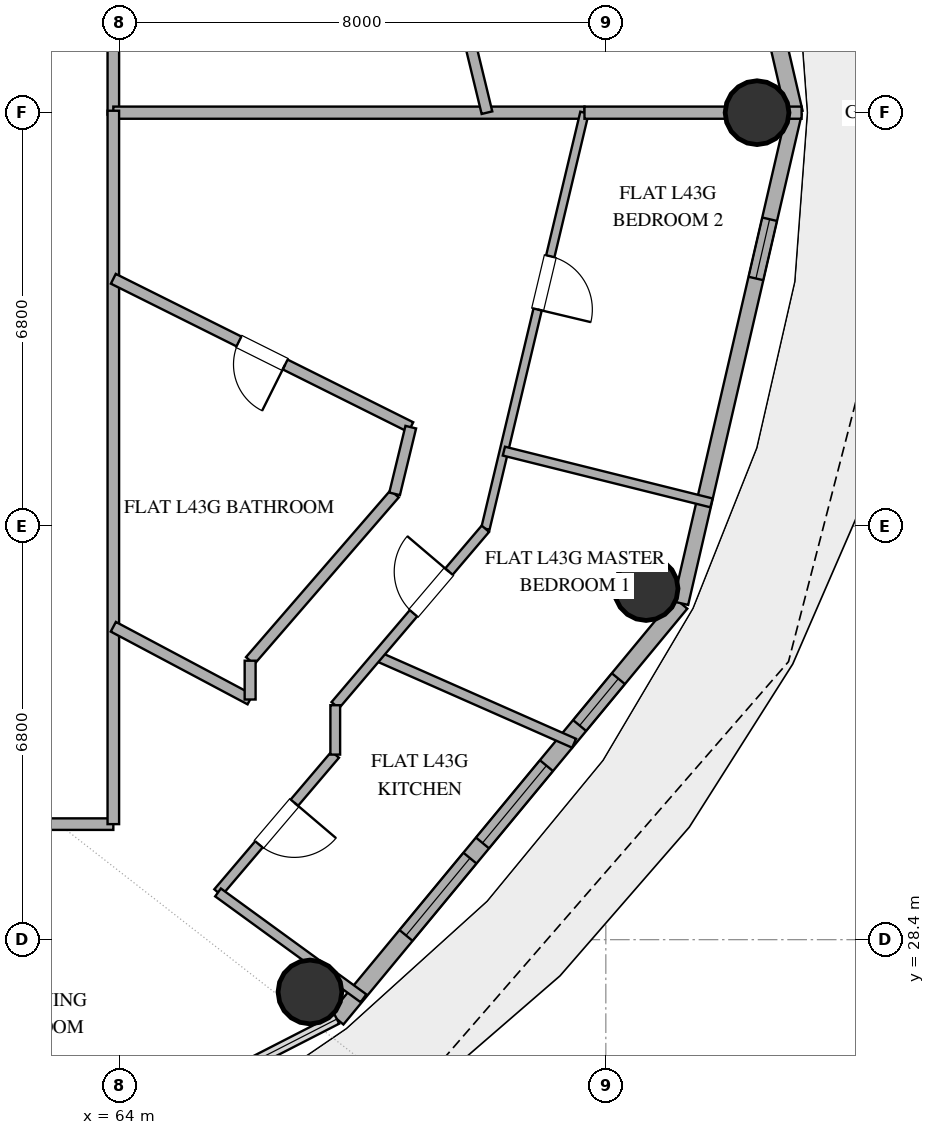
"""IFC4 building model, lengths in metres.
Left out: names, types, materials, properties, quantities, classifications, styles, units other than length and angle.
Written with IfcOpenShell. Run it as: python <this file> out.ifc"""

import sys

from ifc_helpers import new_model, si_unit, direction, frame, frame_2d, origin, origin_2d, place, context, subcontext, project, spatial, rectangle, hollow_circle, extrude, element, fill, save


model = new_model("IFC4")
c1 = context("Model", 3, precision=1e-05, world=origin(), true_north=direction((0.0, 1.0)))
c2 = subcontext(c1, "Body", "Model", "MODEL_VIEW")
j1 = project(units=[si_unit("LENGTHUNIT", "METRE"), si_unit("PLANEANGLEUNIT", "RADIAN")], contexts=[c1])
p1 = place(None, origin())
s1 = spatial("IfcSite", under=j1, at=p1, CompositionType="ELEMENT")
p2 = place(p1, origin())
s2 = spatial("IfcBuilding", under=s1, at=p2, CompositionType="ELEMENT")
p3 = place(p2, frame((0.0, 0.0, 172.2)))
s3 = spatial("IfcBuildingStorey", under=s2, at=p3, CompositionType="ELEMENT", Elevation=172.2)
for number, where, z_axis, x_axis in (
    (1, (74.487, 42.0, 0.0), (0.0, 0.0, 1.0), (1.0, 0.0, 0.0)),
    (2, (67.134, 27.54, 0.0), (0.0, 0.0, 1.0), (1.0, 0.0, 0.0)),
    (3, (72.662, 34.174, 0.0), (0.0, 0.0, 1.0), (1.0, 0.0, 0.0)),
):
    element("IfcColumn", number, at=place(p3, frame(where, z_axis=z_axis, x_axis=x_axis)), inside=s3, PredefinedType="COLUMN", context=c2, shape_type="SweptSolid", body=[
        extrude(hollow_circle(Radius=0.525, WallThickness=0.028, at=origin_2d()), origin(), (0.0, 0.0, 1.0), 3.38),
    ])
p4 = place(p3, frame((75.099, 42.0, 0.0), z_axis=(0.0, 0.0, 1.0), x_axis=(-0.225473184558, 0.974249374157, 0.0)))
e4 = element("IfcWall", 4, at=p4, inside=s3, PredefinedType="SOLIDWALL", context=c2, shape_type="SweptSolid", body=[
    extrude(rectangle(XDim=8.28, YDim=0.28, at=frame_2d((4.14, 0.0))), origin(), (0.0, 0.0, 1.0), 3.38),
])
p5 = place(p4, frame((5.694, 0.0, 0.0)))
e5 = element("IfcOpeningElement", 5, at=p5, cuts=e4, PredefinedType="OPENING", context=c2, shape_type="SweptSolid", body=[
    extrude(rectangle(XDim=1.05, YDim=2.2, at=frame_2d((0.525, 1.1))), frame((0.0, 0.15, 0.0), z_axis=(0.0, -1.0, 0.0), x_axis=(1.0, 0.0, 0.0)), (0.0, 0.0, 1.0), 0.3),
])
p6 = place(p3, frame((67.576, 27.094, 0.0), z_axis=(0.0, 0.0, 1.0), x_axis=(0.637333477683, 0.770588111915, 0.0)))
e6 = element("IfcWall", 6, at=p6, inside=s3, PredefinedType="SOLIDWALL", context=c2, shape_type="SweptSolid", body=[
    extrude(rectangle(XDim=8.875, YDim=0.28, at=frame_2d((4.438, 0.0))), origin(), (0.0, 0.0, 1.0), 3.38),
])
p7 = place(p6, frame((1.785, 0.0, 0.85)))
e7 = element("IfcOpeningElement", 7, at=p7, cuts=e6, PredefinedType="OPENING", context=c2, shape_type="SweptSolid", body=[
    extrude(rectangle(XDim=1.65, YDim=2.0, at=frame_2d((0.825, 1.0))), frame((0.0, 0.15, 0.0), z_axis=(0.0, -1.0, 0.0), x_axis=(1.0, 0.0, 0.0)), (0.0, 0.0, 1.0), 0.3),
])
p8 = place(p6, frame((3.759, 0.0, 0.85)))
e8 = element("IfcOpeningElement", 8, at=p8, cuts=e6, PredefinedType="OPENING", context=c2, shape_type="SweptSolid", body=[
    extrude(rectangle(XDim=1.65, YDim=2.0, at=frame_2d((0.825, 1.0))), frame((0.0, 0.15, 0.0), z_axis=(0.0, -1.0, 0.0), x_axis=(1.0, 0.0, 0.0)), (0.0, 0.0, 1.0), 0.3),
])
p9 = place(p6, frame((6.265, 0.0, 0.85)))
e9 = element("IfcOpeningElement", 9, at=p9, cuts=e6, PredefinedType="OPENING", context=c2, shape_type="SweptSolid", body=[
    extrude(rectangle(XDim=1.0, YDim=1.8, at=frame_2d((0.5, 0.9))), frame((0.0, 0.15, 0.0), z_axis=(0.0, -1.0, 0.0), x_axis=(1.0, 0.0, 0.0)), (0.0, 0.0, 1.0), 0.3),
])
p10 = place(p3, frame((73.232, 33.933, 0.0), z_axis=(0.0, 0.0, 1.0), x_axis=(0.225473184558, 0.974249374157, 0.0)))
e10 = element("IfcWall", 10, at=p10, inside=s3, PredefinedType="SOLIDWALL", context=c2, shape_type="SweptSolid", body=[
    extrude(rectangle(XDim=8.28, YDim=0.25, at=frame_2d((4.14, 0.0))), origin(), (0.0, 0.0, 1.0), 3.38),
])
p11 = place(p10, frame((5.481, 0.0, 1.42)))
e11 = element("IfcOpeningElement", 11, at=p11, cuts=e10, PredefinedType="OPENING", context=c2, shape_type="SweptSolid", body=[
    extrude(rectangle(XDim=1.0, YDim=1.05, at=frame_2d((0.5, 0.525))), frame((0.0, 0.135, 0.0), z_axis=(0.0, -1.0, 0.0), x_axis=(1.0, 0.0, 0.0)), (0.0, 0.0, 1.0), 0.27),
])
p12 = place(p3, frame((44.873, 30.3, 0.0), z_axis=(0.0, 0.0, 1.0), x_axis=(1.0, 0.0, 0.0)))
e12 = element("IfcWall", 12, at=p12, inside=s3, PredefinedType="PARTITIONING", context=c2, shape_type="SweptSolid", body=[
    extrude(rectangle(XDim=19.027, YDim=0.19, at=frame_2d((9.514, 0.0))), origin(), (0.0, 0.0, 1.0), 2.74),
])
p13 = place(p12, frame((5.01, 0.0, 0.0)))
e13 = element("IfcOpeningElement", 13, at=p13, cuts=e12, PredefinedType="OPENING", context=c2, shape_type="SweptSolid", body=[
    extrude(rectangle(XDim=1.0, YDim=2.2, at=frame_2d((0.5, 1.1))), frame((0.0, 0.105, 0.0), z_axis=(0.0, -1.0, 0.0), x_axis=(1.0, 0.0, 0.0)), (0.0, 0.0, 1.0), 0.21),
])
p14 = place(p12, frame((14.504, 0.0, 0.0)))
e14 = element("IfcOpeningElement", 14, at=p14, cuts=e12, PredefinedType="OPENING", context=c2, shape_type="SweptSolid", body=[
    extrude(rectangle(XDim=1.0, YDim=2.2, at=frame_2d((0.5, 1.1))), frame((0.0, 0.105, 0.0), z_axis=(0.0, -1.0, 0.0), x_axis=(1.0, 0.0, 0.0)), (0.0, 0.0, 1.0), 0.21),
])
p15 = place(p3, frame((63.9, 53.7, 0.0), z_axis=(0.0, 0.0, 1.0), x_axis=(0.0, -1.0, 0.0)))
e15 = element("IfcWall", 15, at=p15, inside=s3, PredefinedType="PARTITIONING", context=c2, shape_type="SweptSolid", body=[
    extrude(rectangle(XDim=11.732, YDim=0.19, at=frame_2d((5.866, 0.0))), origin(), (0.0, 0.0, 1.0), 2.74),
])
p16 = place(p15, frame((4.281, 0.0, 0.0)))
e16 = element("IfcOpeningElement", 16, at=p16, cuts=e15, PredefinedType="OPENING", context=c2, shape_type="SweptSolid", body=[
    extrude(rectangle(XDim=1.0, YDim=2.2, at=frame_2d((0.5, 1.1))), frame((0.0, 0.105, 0.0), z_axis=(0.0, -1.0, 0.0), x_axis=(1.0, 0.0, 0.0)), (0.0, 0.0, 1.0), 0.21),
])
p17 = place(p3, frame((63.9, 42.0, 0.0), z_axis=(0.0, 0.0, 1.0), x_axis=(1.0, 0.0, 0.0)))
e17 = element("IfcWall", 17, at=p17, inside=s3, PredefinedType="PARTITIONING", context=c2, shape_type="SweptSolid", body=[
    extrude(rectangle(XDim=7.749, YDim=0.2, at=frame_2d((3.875, 0.0))), origin(), (0.0, 0.0, 1.0), 2.74),
])
p18 = place(p3, frame((63.9, 42.032, 0.0), z_axis=(0.0, 0.0, 1.0), x_axis=(0.0, -1.0, 0.0)))
e18 = element("IfcWall", 18, at=p18, inside=s3, PredefinedType="PARTITIONING", context=c2, shape_type="SweptSolid", body=[
    extrude(rectangle(XDim=11.732, YDim=0.19, at=frame_2d((5.866, 0.0))), origin(), (0.0, 0.0, 1.0), 2.74),
])
p19 = place(p3, frame((71.649, 42.0, 0.0), z_axis=(0.0, 0.0, 1.0), x_axis=(-0.231658068135, -0.972797275627, 0.0)))
e19 = element("IfcWall", 19, at=p19, inside=s3, PredefinedType="PARTITIONING", context=c2, shape_type="SweptSolid", body=[
    extrude(rectangle(XDim=7.034, YDim=0.14, at=frame_2d((3.517, 0.0))), origin(), (0.0, 0.0, 1.0), 2.74),
])
p20 = place(p19, frame((2.427, 0.0, 0.0)))
e20 = element("IfcOpeningElement", 20, at=p20, cuts=e19, PredefinedType="OPENING", context=c2, shape_type="SweptSolid", body=[
    extrude(rectangle(XDim=0.9, YDim=2.1, at=frame_2d((0.45, 1.05))), frame((0.0, 0.08, 0.0), z_axis=(0.0, -1.0, 0.0), x_axis=(1.0, 0.0, 0.0)), (0.0, 0.0, 1.0), 0.16),
])
p21 = place(p3, frame((68.792, 36.828, 0.0), z_axis=(0.0, 0.0, 1.0), x_axis=(-0.894873333185, 0.44632019622, 0.0)))
e21 = element("IfcWall", 21, at=p21, inside=s3, PredefinedType="PLUMBINGWALL", context=c2, shape_type="SweptSolid", body=[
    extrude(rectangle(XDim=5.467, YDim=0.18, at=frame_2d((2.733, 0.0))), origin(), (0.0, 0.0, 1.0), 2.74),
])
p22 = place(p21, frame((2.308, 0.0, 0.0)))
e22 = element("IfcOpeningElement", 22, at=p22, cuts=e21, PredefinedType="OPENING", context=c2, shape_type="SweptSolid", body=[
    extrude(rectangle(XDim=0.85, YDim=2.1, at=frame_2d((0.425, 1.05))), frame((0.0, 0.1, 0.0), z_axis=(0.0, -1.0, 0.0), x_axis=(1.0, 0.0, 0.0)), (0.0, 0.0, 1.0), 0.2),
])
p23 = place(p3, frame((68.912, 46.675, 0.0), z_axis=(0.0, 0.0, 1.0), x_axis=(0.235459111302, -0.97188425592, 0.0)))
e23 = element("IfcWall", 23, at=p23, inside=s3, PredefinedType="PLUMBINGWALL", context=c2, shape_type="SweptSolid", body=[
    extrude(rectangle(XDim=4.81, YDim=0.18, at=frame_2d((2.405, 0.0))), origin(), (0.0, 0.0, 1.0), 2.74),
])
p24 = place(p3, frame((66.15, 32.987, 0.0), z_axis=(0.0, 0.0, 1.0), x_axis=(0.654577130551, 0.755995224958, 0.0)))
e24 = element("IfcWall", 24, at=p24, inside=s3, PredefinedType="PLUMBINGWALL", context=c2, shape_type="SweptSolid", body=[
    extrude(rectangle(XDim=3.63, YDim=0.18, at=frame_2d((1.815, 0.0))), origin(), (0.0, 0.0, 1.0), 2.74),
])
p25 = place(p3, frame((71.649, 42.0, 0.0), z_axis=(0.0, 0.0, 1.0), x_axis=(1.0, 0.0, 0.0)))
e25 = element("IfcWall", 25, at=p25, inside=s3, PredefinedType="PARTITIONING", context=c2, shape_type="SweptSolid", body=[
    extrude(rectangle(XDim=3.571, YDim=0.2, at=frame_2d((1.785, 0.0))), origin(), (0.0, 0.0, 1.0), 2.74),
])
p26 = place(p3, frame((71.478, 31.63, 0.0), z_axis=(0.0, 0.0, 1.0), x_axis=(-0.914752340799, 0.40401504304, 0.0)))
e26 = element("IfcWall", 26, at=p26, inside=s3, PredefinedType="PLUMBINGWALL", context=c2, shape_type="SweptSolid", body=[
    extrude(rectangle(XDim=3.543, YDim=0.16, at=frame_2d((1.772, 0.0))), origin(), (0.0, 0.0, 1.0), 2.74),
])
p27 = place(p3, frame((70.323, 36.434, 0.0), z_axis=(0.0, 0.0, 1.0), x_axis=(0.970301483456, -0.241898803642, 0.0)))
e27 = element("IfcWall", 27, at=p27, inside=s3, PredefinedType="PARTITIONING", context=c2, shape_type="SweptSolid", body=[
    extrude(rectangle(XDim=3.518, YDim=0.15, at=frame_2d((1.759, 0.0))), origin(), (0.0, 0.0, 1.0), 2.74),
])
p28 = place(p3, frame((67.55, 31.443, 0.0), z_axis=(0.0, 0.0, 1.0), x_axis=(-0.647915118337, -0.761712543832, 0.0)))
e28 = element("IfcWall", 28, at=p28, inside=s3, PredefinedType="PLUMBINGWALL", context=c2, shape_type="SweptSolid", body=[
    extrude(rectangle(XDim=2.976, YDim=0.16, at=frame_2d((1.488, 0.0))), origin(), (0.0, 0.0, 1.0), 2.74),
])
p29 = place(p28, frame((1.038, 0.0, 0.0)))
e29 = element("IfcOpeningElement", 29, at=p29, cuts=e28, PredefinedType="OPENING", context=c2, shape_type="SweptSolid", body=[
    extrude(rectangle(XDim=0.9, YDim=2.1, at=frame_2d((0.45, 1.05))), frame((0.0, 0.09, 0.0), z_axis=(0.0, -1.0, 0.0), x_axis=(1.0, 0.0, 0.0)), (0.0, 0.0, 1.0), 0.18),
])
p30 = place(p3, frame((65.622, 29.177, 0.0), z_axis=(0.0, 0.0, 1.0), x_axis=(0.808600464561, -0.588358129638, 0.0)))
e30 = element("IfcWall", 30, at=p30, inside=s3, PredefinedType="PLUMBINGWALL", context=c2, shape_type="SweptSolid", body=[
    extrude(rectangle(XDim=2.958, YDim=0.16, at=frame_2d((1.479, 0.0))), origin(), (0.0, 0.0, 1.0), 2.74),
])
p31 = place(p3, frame((67.55, 32.256, 0.0), z_axis=(0.0, 0.0, 1.0), x_axis=(0.648059335437, 0.761589848773, 0.0)))
e31 = element("IfcWall", 31, at=p31, inside=s3, PredefinedType="PLUMBINGWALL", context=c2, shape_type="SweptSolid", body=[
    extrude(rectangle(XDim=3.811, YDim=0.16, at=frame_2d((1.905, 0.0))), origin(), (0.0, 0.0, 1.0), 2.74),
])
p32 = place(p31, frame((1.985, 0.0, 0.0)))
e32 = element("IfcOpeningElement", 32, at=p32, cuts=e31, PredefinedType="OPENING", context=c2, shape_type="SweptSolid", body=[
    extrude(rectangle(XDim=0.9, YDim=2.1, at=frame_2d((0.45, 1.05))), frame((0.0, 0.09, 0.0), z_axis=(0.0, -1.0, 0.0), x_axis=(1.0, 0.0, 0.0)), (0.0, 0.0, 1.0), 0.18),
])
p33 = place(p3, frame((63.9, 33.546, 0.0), z_axis=(0.0, 0.0, 1.0), x_axis=(0.882956890564, -0.469454075929, 0.0)))
e33 = element("IfcWall", 33, at=p33, inside=s3, PredefinedType="PLUMBINGWALL", context=c2, shape_type="SweptSolid", body=[
    extrude(rectangle(XDim=2.548, YDim=0.18, at=frame_2d((1.274, 0.0))), origin(), (0.0, 0.0, 1.0), 2.74),
])
p34 = place(p3, frame((68.526, 35.732, 0.0), z_axis=(0.0, 0.0, 1.0), x_axis=(0.235606217796, 0.971848604535, 0.0)))
e34 = element("IfcWall", 34, at=p34, inside=s3, PredefinedType="PLUMBINGWALL", context=c2, shape_type="SweptSolid", body=[
    extrude(rectangle(XDim=1.128, YDim=0.18, at=frame_2d((0.564, 0.0))), origin(), (0.0, 0.0, 1.0), 2.74),
])
p35 = place(p3, frame((67.55, 32.256, 0.0), z_axis=(0.0, 0.0, 1.0), x_axis=(0.0, -1.0, 0.0)))
e35 = element("IfcWall", 35, at=p35, inside=s3, PredefinedType="PLUMBINGWALL", context=c2, shape_type="SweptSolid", body=[
    extrude(rectangle(XDim=0.812, YDim=0.16, at=frame_2d((0.406, 0.0))), origin(), (0.0, 0.0, 1.0), 2.74),
])
p36 = place(p3, frame((66.15, 32.35, 0.0), z_axis=(0.0, 0.0, 1.0), x_axis=(0.0, 1.0, 0.0)))
e36 = element("IfcWall", 36, at=p36, inside=s3, PredefinedType="PLUMBINGWALL", context=c2, shape_type="SweptSolid", body=[
    extrude(rectangle(XDim=0.638, YDim=0.18, at=frame_2d((0.319, 0.0))), origin(), (0.0, 0.0, 1.0), 2.74),
])
p37 = place(p7, origin())
e37 = element("IfcWindow", 37, at=p37, inside=s3, PartitioningType="SINGLE_PANEL", PredefinedType="WINDOW", context=c2, shape_type="SweptSolid", body=[
    extrude(rectangle(XDim=1.65, YDim=2.0, at=frame_2d((0.825, 1.0))), frame((0.0, 0.03, 0.0), z_axis=(0.0, -1.0, 0.0), x_axis=(1.0, 0.0, 0.0)), (0.0, 0.0, 1.0), 0.06),
])
fill(e7, e37)
p38 = place(p8, origin())
e38 = element("IfcWindow", 38, at=p38, inside=s3, PartitioningType="SINGLE_PANEL", PredefinedType="WINDOW", context=c2, shape_type="SweptSolid", body=[
    extrude(rectangle(XDim=1.65, YDim=2.0, at=frame_2d((0.825, 1.0))), frame((0.0, 0.03, 0.0), z_axis=(0.0, -1.0, 0.0), x_axis=(1.0, 0.0, 0.0)), (0.0, 0.0, 1.0), 0.06),
])
fill(e8, e38)
p39 = place(p9, origin())
e39 = element("IfcWindow", 39, at=p39, inside=s3, PartitioningType="SINGLE_PANEL", PredefinedType="WINDOW", context=c2, shape_type="SweptSolid", body=[
    extrude(rectangle(XDim=1.0, YDim=1.8, at=frame_2d((0.5, 0.9))), frame((0.0, 0.03, 0.0), z_axis=(0.0, -1.0, 0.0), x_axis=(1.0, 0.0, 0.0)), (0.0, 0.0, 1.0), 0.06),
])
fill(e9, e39)
p40 = place(p11, origin())
e40 = element("IfcWindow", 40, at=p40, inside=s3, PartitioningType="SINGLE_PANEL", PredefinedType="WINDOW", context=c2, shape_type="SweptSolid", body=[
    extrude(rectangle(XDim=1.0, YDim=1.05, at=frame_2d((0.5, 0.525))), frame((0.0, 0.03, 0.0), z_axis=(0.0, -1.0, 0.0), x_axis=(1.0, 0.0, 0.0)), (0.0, 0.0, 1.0), 0.06),
])
fill(e11, e40)
p41 = place(p20, origin())
e41 = element("IfcDoor", 41, at=p41, inside=s3, OperationType="SINGLE_SWING_RIGHT", PredefinedType="DOOR", context=c2, shape_type="SweptSolid", body=[
    extrude(rectangle(XDim=0.9, YDim=2.1, at=frame_2d((0.45, 1.05))), frame((0.0, 0.025, 0.0), z_axis=(0.0, -1.0, 0.0), x_axis=(1.0, 0.0, 0.0)), (0.0, 0.0, 1.0), 0.05),
])
fill(e20, e41)
p42 = place(p22, origin())
e42 = element("IfcDoor", 42, at=p42, inside=s3, OperationType="SINGLE_SWING_LEFT", PredefinedType="DOOR", context=c2, shape_type="SweptSolid", body=[
    extrude(rectangle(XDim=0.85, YDim=2.1, at=frame_2d((0.425, 1.05))), frame((0.0, 0.025, 0.0), z_axis=(0.0, -1.0, 0.0), x_axis=(1.0, 0.0, 0.0)), (0.0, 0.0, 1.0), 0.05),
])
fill(e22, e42)
p43 = place(p29, origin())
e43 = element("IfcDoor", 43, at=p43, inside=s3, OperationType="SINGLE_SWING_LEFT", PredefinedType="DOOR", context=c2, shape_type="SweptSolid", body=[
    extrude(rectangle(XDim=0.9, YDim=2.1, at=frame_2d((0.45, 1.05))), frame((0.0, 0.025, 0.0), z_axis=(0.0, -1.0, 0.0), x_axis=(1.0, 0.0, 0.0)), (0.0, 0.0, 1.0), 0.05),
])
fill(e29, e43)
p44 = place(p32, origin())
e44 = element("IfcDoor", 44, at=p44, inside=s3, OperationType="SINGLE_SWING_RIGHT", PredefinedType="DOOR", context=c2, shape_type="SweptSolid", body=[
    extrude(rectangle(XDim=0.9, YDim=2.1, at=frame_2d((0.45, 1.05))), frame((0.0, 0.025, 0.0), z_axis=(0.0, -1.0, 0.0), x_axis=(1.0, 0.0, 0.0)), (0.0, 0.0, 1.0), 0.05),
])
fill(e32, e44)
save(model, sys.argv[1])
